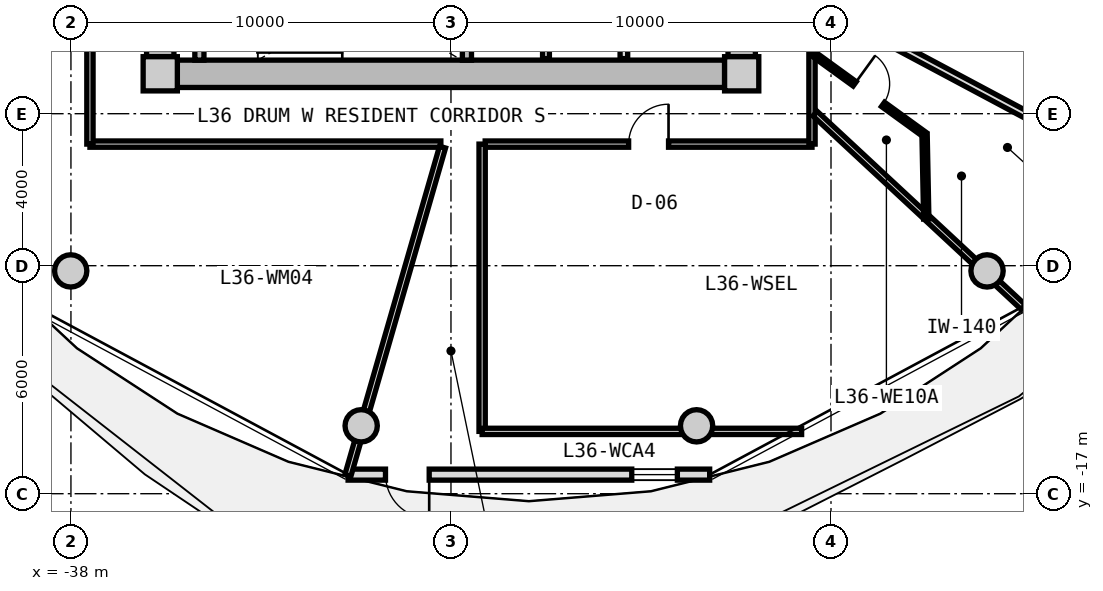
"""IFC4 building model, lengths in metres.
Left out: names, types, materials, properties, quantities, classifications, styles, units other than length and angle.
Written with IfcOpenShell. Run it as: python <this file> out.ifc"""

import sys

from ifc_helpers import new_model, si_unit, direction, frame, frame_2d, origin, origin_2d, place, context, subcontext, project, spatial, rectangle, circle, extrude, source, transform, mapped, element, fill, save


model = new_model("IFC4")
c1 = context("Model", 3, precision=1e-05, world=origin(), true_north=direction((0.0, 1.0)))
c2 = subcontext(c1, "Body", "Model", "MODEL_VIEW")
j1 = project(units=[si_unit("LENGTHUNIT", "METRE"), si_unit("PLANEANGLEUNIT", "RADIAN")], contexts=[c1])
p1 = place(None, origin())
s1 = spatial("IfcSite", under=j1, at=p1, CompositionType="ELEMENT")
p2 = place(p1, origin())
s2 = spatial("IfcBuilding", under=s1, at=p2, CompositionType="ELEMENT")
p3 = place(p2, frame((0.0, 0.0, 117.6)))
s3 = spatial("IfcBuildingStorey", under=s2, at=p3, CompositionType="ELEMENT", Elevation=117.6)
m1 = source(origin(), c2, "Body", "SweptSolid", [
    extrude(rectangle(XDim=0.9, YDim=0.9, at=origin_2d()), origin(), (0.0, 0.0, 1.0), 3.05),
])
for number, where, z_axis, x_axis in (
    (1, (-35.65, -5.95, 0.0), (0.0, 0.0, 1.0), (1.0, 0.0, 0.0)),
    (2, (-20.35, -5.95, 0.0), (0.0, 0.0, 1.0), (1.0, 0.0, 0.0)),
):
    element("IfcColumn", number, at=place(p3, frame(where, z_axis=z_axis, x_axis=x_axis)), inside=s3, PredefinedType="COLUMN", context=c2, shape_type="MappedRepresentation", body=[
        mapped(m1, transform((0.0, 0.0, 0.0), x_axis=(1.0, 0.0, 0.0), y_axis=(0.0, 1.0, 0.0), z_axis=(0.0, 0.0, 1.0), scale=1.0)),
    ])
m2 = source(origin(), c2, "Body", "SweptSolid", [
    extrude(rectangle(XDim=14.4, YDim=0.72, at=frame_2d((7.2, 0.0))), origin(), (0.0, 0.0, 1.0), 2.79),
])
p4 = place(p3, frame((-20.8, -5.95, 0.0), z_axis=(0.0, 0.0, 1.0), x_axis=(-1.0, 0.0, 0.0)))
e3 = element("IfcWall", 3, at=p4, inside=s3, PredefinedType="SHEAR", context=c2, shape_type="MappedRepresentation", body=[
    mapped(m2, transform((0.0, 0.0, 0.0), x_axis=(1.0, 0.0, 0.0), y_axis=(0.0, 1.0, 0.0), z_axis=(0.0, 0.0, 1.0), scale=1.0)),
])
m3 = source(origin(), c2, "Body", "SweptSolid", [
    extrude(rectangle(XDim=11.0, YDim=0.72, at=frame_2d((5.5, 0.0))), origin(), (0.0, 0.0, 1.0), 2.79),
])
p5 = place(p3, frame((-35.65, -5.5, 0.0), z_axis=(0.0, 0.0, 1.0), x_axis=(0.0, 1.0, 0.0)))
e4 = element("IfcWall", 4, at=p5, inside=s3, PredefinedType="SHEAR", context=c2, shape_type="MappedRepresentation", body=[
    mapped(m3, transform((0.0, 0.0, 0.0), x_axis=(1.0, 0.0, 0.0), y_axis=(0.0, 1.0, 0.0), z_axis=(0.0, 0.0, 1.0), scale=1.0)),
])
p6 = place(p5, frame((3.8, 0.0, 0.0)))
e5 = element("IfcOpeningElement", 5, at=p6, cuts=e4, PredefinedType="OPENING", context=c2, shape_type="SweptSolid", body=[
    extrude(rectangle(XDim=1.2, YDim=2.15, at=frame_2d((0.6, 1.075))), frame((0.0, 0.37, 0.0), z_axis=(0.0, -1.0, 0.0), x_axis=(1.0, 0.0, 0.0)), (0.0, 0.0, 1.0), 0.74),
])
p7 = place(p3, frame((-20.35, 5.5, 0.0), z_axis=(0.0, 0.0, 1.0), x_axis=(0.0, -1.0, 0.0)))
e6 = element("IfcWall", 6, at=p7, inside=s3, PredefinedType="SHEAR", context=c2, shape_type="MappedRepresentation", body=[
    mapped(m3, transform((0.0, 0.0, 0.0), x_axis=(1.0, 0.0, 0.0), y_axis=(0.0, 1.0, 0.0), z_axis=(0.0, 0.0, 1.0), scale=1.0)),
])
p8 = place(p7, frame((5.65, 0.0, 0.0)))
e7 = element("IfcOpeningElement", 7, at=p8, cuts=e6, PredefinedType="OPENING", context=c2, shape_type="SweptSolid", body=[
    extrude(rectangle(XDim=1.2, YDim=2.15, at=frame_2d((0.6, 1.075))), frame((0.0, 0.37, 0.0), z_axis=(0.0, -1.0, 0.0), x_axis=(1.0, 0.0, 0.0)), (0.0, 0.0, 1.0), 0.74),
])
m4 = source(origin(), c2, "Body", "SweptSolid", [
    extrude(circle(Radius=0.425, at=origin_2d()), origin(), (0.0, 0.0, 1.0), 3.05),
])
for number, where, z_axis, x_axis in (
    (8, (-38.006, -11.137, 0.0), (0.0, 0.0, 1.0), (1.0, 0.0, 0.0)),
    (9, (-30.363, -15.213, 0.0), (0.0, 0.0, 1.0), (1.0, 0.0, 0.0)),
    (10, (-21.537, -15.213, 0.0), (0.0, 0.0, 1.0), (1.0, 0.0, 0.0)),
    (11, (-13.894, -11.137, 0.0), (0.0, 0.0, 1.0), (1.0, 0.0, 0.0)),
):
    element("IfcColumn", number, at=place(p3, frame(where, z_axis=z_axis, x_axis=x_axis)), inside=s3, PredefinedType="COLUMN", context=c2, shape_type="MappedRepresentation", body=[
        mapped(m4, transform((0.0, 0.0, 0.0), x_axis=(1.0, 0.0, 0.0), y_axis=(0.0, 1.0, 0.0), z_axis=(0.0, 0.0, 1.0), scale=1.0)),
    ])
m5 = source(origin(), c2, "Body", "SweptSolid", [
    extrude(rectangle(XDim=9.514, YDim=0.29, at=frame_2d((4.757, 0.0))), origin(), (0.0, 0.0, 1.0), 2.79),
])
p9 = place(p3, frame((-21.193, -16.498, 0.0), z_axis=(0.0, 0.0, 1.0), x_axis=(-1.0, 0.0, 0.0)))
e12 = element("IfcWall", 12, at=p9, inside=s3, PredefinedType="SOLIDWALL", context=c2, shape_type="MappedRepresentation", body=[
    mapped(m5, transform((0.0, 0.0, 0.0), x_axis=(1.0, 0.0, 0.0), y_axis=(0.0, 1.0, 0.0), z_axis=(0.0, 0.0, 1.0), scale=1.0)),
])
p10 = place(p9, frame((7.38, 0.0, 0.0)))
e13 = element("IfcOpeningElement", 13, at=p10, cuts=e12, PredefinedType="OPENING", context=c2, shape_type="SweptSolid", body=[
    extrude(rectangle(XDim=1.15, YDim=2.25, at=frame_2d((0.575, 1.125))), frame((0.0, 0.155, 0.0), z_axis=(0.0, -1.0, 0.0), x_axis=(1.0, 0.0, 0.0)), (0.0, 0.0, 1.0), 0.31),
])
p11 = place(p9, frame((0.85, 0.0, 0.85)))
e14 = element("IfcOpeningElement", 14, at=p11, cuts=e12, PredefinedType="OPENING", context=c2, shape_type="SweptSolid", body=[
    extrude(rectangle(XDim=1.2, YDim=1.5, at=frame_2d((0.6, 0.75))), frame((0.0, 0.155, 0.0), z_axis=(0.0, -1.0, 0.0), x_axis=(1.0, 0.0, 0.0)), (0.0, 0.0, 1.0), 0.31),
])
m6 = source(origin(), c2, "Body", "SweptSolid", [
    extrude(rectangle(XDim=3.14, YDim=0.24, at=frame_2d((1.57, 0.0))), origin(), (0.0, 0.0, 1.0), 2.79),
])
for number, where, z_axis, x_axis in (
    (15, (-34.62, -5.59, 0.0), (0.0, 0.0, 1.0), (0.0, 1.0, 0.0)),
    (16, (-27.58, -5.59, 0.0), (0.0, 0.0, 1.0), (0.0, 1.0, 0.0)),
):
    element("IfcWall", number, at=place(p3, frame(where, z_axis=z_axis, x_axis=x_axis)), inside=s3, PredefinedType="PARTITIONING", context=c2, shape_type="MappedRepresentation", body=[
        mapped(m6, transform((0.0, 0.0, 0.0), x_axis=(1.0, 0.0, 0.0), y_axis=(0.0, 1.0, 0.0), z_axis=(0.0, 0.0, 1.0), scale=1.0)),
    ])
m7 = source(origin(), c2, "Body", "SweptSolid", [
    extrude(rectangle(XDim=3.8, YDim=0.2, at=frame_2d((1.9, 0.0))), origin(), (0.0, 0.0, 1.0), 2.775),
])
p12 = place(p3, frame((-23.45, -5.55, 0.0), z_axis=(0.0, 0.0, 1.0), x_axis=(0.0, 1.0, 0.0)))
e17 = element("IfcWall", 17, at=p12, inside=s3, PredefinedType="PARTITIONING", context=c2, shape_type="MappedRepresentation", body=[
    mapped(m7, transform((0.0, 0.0, 0.0), x_axis=(1.0, 0.0, 0.0), y_axis=(0.0, 1.0, 0.0), z_axis=(0.0, 0.0, 1.0), scale=1.0)),
])
m8 = source(origin(), c2, "Body", "SweptSolid", [
    extrude(rectangle(XDim=3.22, YDim=0.18, at=frame_2d((1.61, 0.0))), origin(), (0.0, 0.0, 1.0), 2.775),
])
p13 = place(p3, frame((-25.5, -5.55, 0.0), z_axis=(0.0, 0.0, 1.0), x_axis=(0.0, 1.0, 0.0)))
e18 = element("IfcWall", 18, at=p13, inside=s3, PredefinedType="PARTITIONING", context=c2, shape_type="MappedRepresentation", body=[
    mapped(m8, transform((0.0, 0.0, 0.0), x_axis=(1.0, 0.0, 0.0), y_axis=(0.0, 1.0, 0.0), z_axis=(0.0, 0.0, 1.0), scale=1.0)),
])
m9 = source(origin(), c2, "Body", "SweptSolid", [
    extrude(rectangle(XDim=8.6, YDim=0.165, at=frame_2d((4.3, 0.0))), origin(), (0.0, 0.0, 1.0), 2.775),
])
p14 = place(p3, frame((-18.5, -7.8, 0.0), z_axis=(0.0, 0.0, 1.0), x_axis=(-1.0, 0.0, 0.0)))
e19 = element("IfcWall", 19, at=p14, inside=s3, PredefinedType="PARTITIONING", context=c2, shape_type="MappedRepresentation", body=[
    mapped(m9, transform((0.0, 0.0, 0.0), x_axis=(1.0, 0.0, 0.0), y_axis=(0.0, 1.0, 0.0), z_axis=(0.0, 0.0, 1.0), scale=1.0)),
])
p15 = place(p14, frame((3.775, 0.0, 0.0)))
e20 = element("IfcOpeningElement", 20, at=p15, cuts=e19, PredefinedType="OPENING", context=c2, shape_type="SweptSolid", body=[
    extrude(rectangle(XDim=1.05, YDim=2.15, at=frame_2d((0.525, 1.075))), frame((0.0, 0.093, 0.0), z_axis=(0.0, -1.0, 0.0), x_axis=(1.0, 0.0, 0.0)), (0.0, 0.0, 1.0), 0.185),
])
m10 = source(origin(), c2, "Body", "SweptSolid", [
    extrude(rectangle(XDim=9.234, YDim=0.165, at=frame_2d((4.617, 0.0))), origin(), (0.0, 0.0, 1.0), 2.775),
])
p16 = place(p3, frame((-28.266, -7.8, 0.0), z_axis=(0.0, 0.0, 1.0), x_axis=(-1.0, 0.0, 0.0)))
e21 = element("IfcWall", 21, at=p16, inside=s3, PredefinedType="PARTITIONING", context=c2, shape_type="MappedRepresentation", body=[
    mapped(m10, transform((0.0, 0.0, 0.0), x_axis=(1.0, 0.0, 0.0), y_axis=(0.0, 1.0, 0.0), z_axis=(0.0, 0.0, 1.0), scale=1.0)),
])
m11 = source(origin(), c2, "Body", "SweptSolid", [
    extrude(rectangle(XDim=15.6, YDim=0.165, at=frame_2d((7.8, 0.0))), origin(), (0.0, 0.0, 1.0), 2.775),
])
p17 = place(p3, frame((-37.5, -7.8, 0.0), z_axis=(0.0, 0.0, 1.0), x_axis=(0.0, 1.0, 0.0)))
e22 = element("IfcWall", 22, at=p17, inside=s3, PredefinedType="PARTITIONING", context=c2, shape_type="MappedRepresentation", body=[
    mapped(m11, transform((0.0, 0.0, 0.0), x_axis=(1.0, 0.0, 0.0), y_axis=(0.0, 1.0, 0.0), z_axis=(0.0, 0.0, 1.0), scale=1.0)),
])
p18 = place(p17, frame((7.175, 0.0, 0.0)))
e23 = element("IfcOpeningElement", 23, at=p18, cuts=e22, PredefinedType="OPENING", context=c2, shape_type="SweptSolid", body=[
    extrude(rectangle(XDim=1.25, YDim=2.2, at=frame_2d((0.625, 1.1))), frame((0.0, 0.093, 0.0), z_axis=(0.0, -1.0, 0.0), x_axis=(1.0, 0.0, 0.0)), (0.0, 0.0, 1.0), 0.185),
])
p19 = place(p3, frame((-18.5, 7.8, 0.0), z_axis=(0.0, 0.0, 1.0), x_axis=(0.0, -1.0, 0.0)))
e24 = element("IfcWall", 24, at=p19, inside=s3, PredefinedType="PARTITIONING", context=c2, shape_type="MappedRepresentation", body=[
    mapped(m11, transform((0.0, 0.0, 0.0), x_axis=(1.0, 0.0, 0.0), y_axis=(0.0, 1.0, 0.0), z_axis=(0.0, 0.0, 1.0), scale=1.0)),
])
p20 = place(p19, frame((12.002, 0.0, 0.0)))
e25 = element("IfcOpeningElement", 25, at=p20, cuts=e24, PredefinedType="OPENING", context=c2, shape_type="SweptSolid", body=[
    extrude(rectangle(XDim=1.05, YDim=2.15, at=frame_2d((0.525, 1.075))), frame((0.0, 0.093, 0.0), z_axis=(0.0, -1.0, 0.0), x_axis=(1.0, 0.0, 0.0)), (0.0, 0.0, 1.0), 0.185),
])
p21 = place(p19, frame((10.211, 0.0, 0.0)))
e26 = element("IfcOpeningElement", 26, at=p21, cuts=e24, PredefinedType="OPENING", context=c2, shape_type="SweptSolid", body=[
    extrude(rectangle(XDim=1.05, YDim=2.15, at=frame_2d((0.525, 1.075))), frame((0.0, 0.093, 0.0), z_axis=(0.0, -1.0, 0.0), x_axis=(1.0, 0.0, 0.0)), (0.0, 0.0, 1.0), 0.185),
])
p22 = place(p19, frame((8.212, 0.0, 0.0)))
e27 = element("IfcOpeningElement", 27, at=p22, cuts=e24, PredefinedType="OPENING", context=c2, shape_type="SweptSolid", body=[
    extrude(rectangle(XDim=1.05, YDim=2.15, at=frame_2d((0.525, 1.075))), frame((0.0, 0.093, 0.0), z_axis=(0.0, -1.0, 0.0), x_axis=(1.0, 0.0, 0.0)), (0.0, 0.0, 1.0), 0.185),
])
p23 = place(p19, frame((6.291, 0.0, 0.0)))
e28 = element("IfcOpeningElement", 28, at=p23, cuts=e24, PredefinedType="OPENING", context=c2, shape_type="SweptSolid", body=[
    extrude(rectangle(XDim=1.05, YDim=2.15, at=frame_2d((0.525, 1.075))), frame((0.0, 0.093, 0.0), z_axis=(0.0, -1.0, 0.0), x_axis=(1.0, 0.0, 0.0)), (0.0, 0.0, 1.0), 0.185),
])
p24 = place(p19, frame((4.739, 0.0, 0.0)))
e29 = element("IfcOpeningElement", 29, at=p24, cuts=e24, PredefinedType="OPENING", context=c2, shape_type="SweptSolid", body=[
    extrude(rectangle(XDim=0.92, YDim=2.1, at=frame_2d((0.46, 1.05))), frame((0.0, 0.093, 0.0), z_axis=(0.0, -1.0, 0.0), x_axis=(1.0, 0.0, 0.0)), (0.0, 0.0, 1.0), 0.185),
])
p25 = place(p19, frame((2.096, 0.0, 0.0)))
e30 = element("IfcOpeningElement", 30, at=p25, cuts=e24, PredefinedType="OPENING", context=c2, shape_type="SweptSolid", body=[
    extrude(rectangle(XDim=0.92, YDim=2.1, at=frame_2d((0.46, 1.05))), frame((0.0, 0.093, 0.0), z_axis=(0.0, -1.0, 0.0), x_axis=(1.0, 0.0, 0.0)), (0.0, 0.0, 1.0), 0.185),
])
m12 = source(origin(), c2, "Body", "SweptSolid", [
    extrude(rectangle(XDim=8.989, YDim=0.165, at=frame_2d((4.495, 0.0))), origin(), (0.0, 0.0, 1.0), 2.275),
])
p26 = place(p3, frame((-28.222, -7.88, 0.0), z_axis=(0.0, 0.0, 1.0), x_axis=(-0.27702323008, -0.960863221274, 0.0)))
e31 = element("IfcWall", 31, at=p26, inside=s3, PredefinedType="PARTITIONING", context=c2, shape_type="MappedRepresentation", body=[
    mapped(m12, transform((0.0, 0.0, 0.0), x_axis=(1.0, 0.0, 0.0), y_axis=(0.0, 1.0, 0.0), z_axis=(0.0, 0.0, 1.0), scale=1.0)),
])
m13 = source(origin(), c2, "Body", "SweptSolid", [
    extrude(rectangle(XDim=7.482, YDim=0.165, at=frame_2d((3.741, 0.0))), origin(), (0.0, 0.0, 1.0), 2.275),
])
p27 = place(p3, frame((-18.42, -6.998, 0.0), z_axis=(0.0, 0.0, 1.0), x_axis=(0.732508698043, -0.680757671489, 0.0)))
e32 = element("IfcWall", 32, at=p27, inside=s3, PredefinedType="PARTITIONING", context=c2, shape_type="MappedRepresentation", body=[
    mapped(m13, transform((0.0, 0.0, 0.0), x_axis=(1.0, 0.0, 0.0), y_axis=(0.0, 1.0, 0.0), z_axis=(0.0, 0.0, 1.0), scale=1.0)),
])
m14 = source(origin(), c2, "Body", "SweptSolid", [
    extrude(rectangle(XDim=7.56, YDim=0.165, at=frame_2d((3.78, 0.0))), origin(), (0.0, 0.0, 1.0), 2.775),
])
p28 = place(p3, frame((-27.18, -15.36, 0.0), z_axis=(0.0, 0.0, 1.0), x_axis=(0.0, 1.0, 0.0)))
e33 = element("IfcWall", 33, at=p28, inside=s3, PredefinedType="PARTITIONING", context=c2, shape_type="MappedRepresentation", body=[
    mapped(m14, transform((0.0, 0.0, 0.0), x_axis=(1.0, 0.0, 0.0), y_axis=(0.0, 1.0, 0.0), z_axis=(0.0, 0.0, 1.0), scale=1.0)),
])
m15 = source(origin(), c2, "Body", "SweptSolid", [
    extrude(rectangle(XDim=8.407, YDim=0.165, at=frame_2d((4.204, 0.0))), origin(), (0.0, 0.0, 1.0), 2.275),
])
p29 = place(p3, frame((-27.18, -15.36, 0.0), z_axis=(0.0, 0.0, 1.0), x_axis=(1.0, 0.0, 0.0)))
e34 = element("IfcWall", 34, at=p29, inside=s3, PredefinedType="PARTITIONING", context=c2, shape_type="MappedRepresentation", body=[
    mapped(m15, transform((0.0, 0.0, 0.0), x_axis=(1.0, 0.0, 0.0), y_axis=(0.0, 1.0, 0.0), z_axis=(0.0, 0.0, 1.0), scale=1.0)),
])
m16 = source(origin(), c2, "Body", "SweptSolid", [
    extrude(rectangle(XDim=8.744, YDim=0.19, at=frame_2d((4.372, 0.0))), origin(), (0.0, 0.0, 1.0), 2.775),
])
p30 = place(p3, frame((-18.273, -4.142, 0.0), z_axis=(0.0, 0.0, 1.0), x_axis=(0.882252449936, -0.470776607938, 0.0)))
e35 = element("IfcWall", 35, at=p30, inside=s3, PredefinedType="PARTITIONING", context=c2, shape_type="MappedRepresentation", body=[
    mapped(m16, transform((0.0, 0.0, 0.0), x_axis=(1.0, 0.0, 0.0), y_axis=(0.0, 1.0, 0.0), z_axis=(0.0, 0.0, 1.0), scale=1.0)),
])
m17 = source(origin(), c2, "Body", "SweptSolid", [
    extrude(rectangle(XDim=3.621, YDim=0.14, at=frame_2d((1.811, 0.0))), origin(), (0.0, 0.0, 1.0), 2.775),
])
p31 = place(p3, frame((-18.47, -5.422, 0.0), z_axis=(0.0, 0.0, 1.0), x_axis=(0.80968252222, -0.586868139544, 0.0)))
e36 = element("IfcWall", 36, at=p31, inside=s3, PredefinedType="PARTITIONING", context=c2, shape_type="MappedRepresentation", body=[
    mapped(m17, transform((0.0, 0.0, 0.0), x_axis=(1.0, 0.0, 0.0), y_axis=(0.0, 1.0, 0.0), z_axis=(0.0, 0.0, 1.0), scale=1.0)),
])
p32 = place(p31, frame((1.351, 0.0, 0.0)))
e37 = element("IfcOpeningElement", 37, at=p32, cuts=e36, PredefinedType="OPENING", context=c2, shape_type="SweptSolid", body=[
    extrude(rectangle(XDim=0.92, YDim=2.1, at=frame_2d((0.46, 1.05))), frame((0.0, 0.08, 0.0), z_axis=(0.0, -1.0, 0.0), x_axis=(1.0, 0.0, 0.0)), (0.0, 0.0, 1.0), 0.16),
])
m18 = source(origin(), c2, "Body", "SweptSolid", [
    extrude(rectangle(XDim=2.225, YDim=0.14, at=frame_2d((1.112, 0.0))), origin(), (0.0, 0.0, 1.0), 2.775),
])
p33 = place(p3, frame((-15.538, -7.547, 0.0), z_axis=(0.0, 0.0, 1.0), x_axis=(0.019971869027, -0.999800542332, 0.0)))
e38 = element("IfcWall", 38, at=p33, inside=s3, PredefinedType="PARTITIONING", context=c2, shape_type="MappedRepresentation", body=[
    mapped(m18, transform((0.0, 0.0, 0.0), x_axis=(1.0, 0.0, 0.0), y_axis=(0.0, 1.0, 0.0), z_axis=(0.0, 0.0, 1.0), scale=1.0)),
])
m19 = source(origin(), c2, "Body", "SweptSolid", [
    extrude(rectangle(XDim=1.15, YDim=2.25, at=frame_2d((0.575, 1.125))), frame((0.0, 0.025, 0.0), z_axis=(0.0, -1.0, 0.0), x_axis=(1.0, 0.0, 0.0)), (0.0, 0.0, 1.0), 0.05),
])
p34 = place(p10, origin())
e39 = element("IfcDoor", 39, at=p34, inside=s3, OperationType="SINGLE_SWING_LEFT", PredefinedType="DOOR", context=c2, shape_type="MappedRepresentation", body=[
    mapped(m19, transform((0.0, 0.0, 0.0), x_axis=(1.0, 0.0, 0.0), y_axis=(0.0, 1.0, 0.0), z_axis=(0.0, 0.0, 1.0), scale=1.0)),
])
fill(e13, e39)
m20 = source(origin(), c2, "Body", "SweptSolid", [
    extrude(rectangle(XDim=1.2, YDim=1.5, at=frame_2d((0.6, 0.75))), frame((0.0, 0.03, 0.0), z_axis=(0.0, -1.0, 0.0), x_axis=(1.0, 0.0, 0.0)), (0.0, 0.0, 1.0), 0.06),
])
p35 = place(p11, origin())
e40 = element("IfcWindow", 40, at=p35, inside=s3, PartitioningType="SINGLE_PANEL", PredefinedType="WINDOW", context=c2, shape_type="MappedRepresentation", body=[
    mapped(m20, transform((0.0, 0.0, 0.0), x_axis=(1.0, 0.0, 0.0), y_axis=(0.0, 1.0, 0.0), z_axis=(0.0, 0.0, 1.0), scale=1.0)),
])
fill(e14, e40)
m21 = source(origin(), c2, "Body", "SweptSolid", [
    extrude(rectangle(XDim=1.05, YDim=2.15, at=frame_2d((0.525, 1.075))), frame((0.0, 0.025, 0.0), z_axis=(0.0, -1.0, 0.0), x_axis=(1.0, 0.0, 0.0)), (0.0, 0.0, 1.0), 0.05),
])
p36 = place(p15, frame((1.05, 0.0, 0.0), z_axis=(0.0, 0.0, 1.0), x_axis=(-1.0, 0.0, 0.0)))
e41 = element("IfcDoor", 41, at=p36, inside=s3, OperationType="SINGLE_SWING_RIGHT", PredefinedType="DOOR", context=c2, shape_type="MappedRepresentation", body=[
    mapped(m21, transform((0.0, 0.0, 0.0), x_axis=(1.0, 0.0, 0.0), y_axis=(0.0, 1.0, 0.0), z_axis=(0.0, 0.0, 1.0), scale=1.0)),
])
fill(e20, e41)
m22 = source(origin(), c2, "Body", "SweptSolid", [
    extrude(rectangle(XDim=0.92, YDim=2.1, at=frame_2d((0.46, 1.05))), frame((0.0, 0.025, 0.0), z_axis=(0.0, -1.0, 0.0), x_axis=(1.0, 0.0, 0.0)), (0.0, 0.0, 1.0), 0.05),
])
p37 = place(p32, origin())
e42 = element("IfcDoor", 42, at=p37, inside=s3, OperationType="SINGLE_SWING_LEFT", PredefinedType="DOOR", context=c2, shape_type="MappedRepresentation", body=[
    mapped(m22, transform((0.0, 0.0, 0.0), x_axis=(1.0, 0.0, 0.0), y_axis=(0.0, 1.0, 0.0), z_axis=(0.0, 0.0, 1.0), scale=1.0)),
])
fill(e37, e42)
save(model, sys.argv[1])
